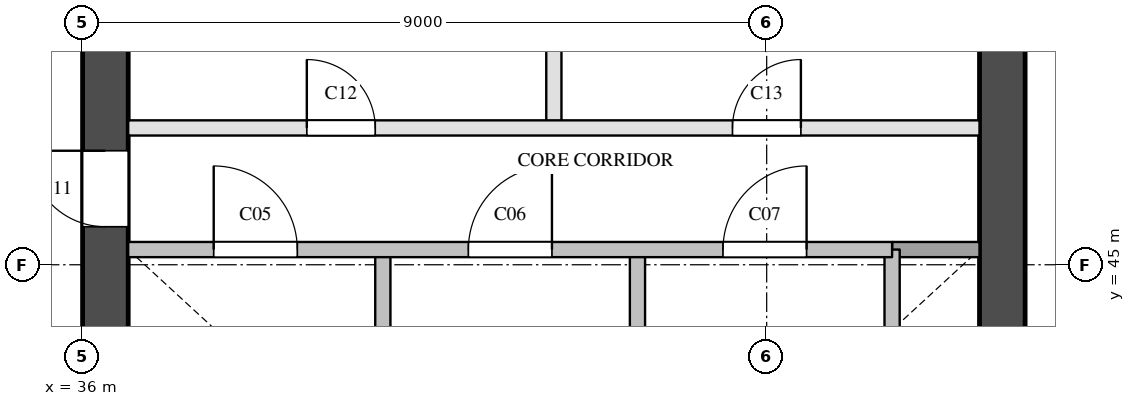
"""IFC4 building model, lengths in metres.
Left out: names, types, materials, properties, quantities, classifications, styles, units other than length and angle.
Written with IfcOpenShell. Run it as: python <this file> out.ifc"""

import sys

from ifc_helpers import new_model, si_unit, direction, frame, frame_2d, origin, place, context, subcontext, project, spatial, rectangle, extrude, element, fill, save


model = new_model("IFC4")
c1 = context("Model", 3, precision=1e-05, world=origin(), true_north=direction((0.0, 1.0)))
c2 = subcontext(c1, "Body", "Model", "MODEL_VIEW")
j1 = project(units=[si_unit("LENGTHUNIT", "METRE"), si_unit("PLANEANGLEUNIT", "RADIAN")], contexts=[c1])
p1 = place(None, origin())
s1 = spatial("IfcSite", under=j1, at=p1, CompositionType="ELEMENT")
p2 = place(p1, origin())
s2 = spatial("IfcBuilding", under=s1, at=p2, CompositionType="ELEMENT")
p3 = place(p2, frame((0.0, 0.0, 112.0)))
s3 = spatial("IfcBuildingStorey", under=s2, at=p3, CompositionType="ELEMENT", Elevation=112.0)
p4 = place(p3, frame((36.3, 29.1, 0.0), z_axis=(0.0, 0.0, 1.0), x_axis=(0.0, 1.0, 0.0)))
e1 = element("IfcWall", 1, at=p4, inside=s3, PredefinedType="SHEAR", context=c2, shape_type="SweptSolid", body=[
    extrude(rectangle(XDim=20.3, YDim=0.6, at=frame_2d((10.15, 0.0))), origin(), (0.0, 0.0, 1.0), 3.5),
])
p5 = place(p4, frame((3.6, 0.0, 0.0)))
e2 = element("IfcOpeningElement", 2, at=p5, cuts=e1, PredefinedType="OPENING", context=c2, shape_type="SweptSolid", body=[
    extrude(rectangle(XDim=1.8, YDim=2.1, at=frame_2d((0.9, 1.05))), frame((0.0, 0.31, 0.0), z_axis=(0.0, -1.0, 0.0), x_axis=(1.0, 0.0, 0.0)), (0.0, 0.0, 1.0), 0.62),
])
p6 = place(p4, frame((16.4, 0.0, 0.0)))
e3 = element("IfcOpeningElement", 3, at=p6, cuts=e1, PredefinedType="OPENING", context=c2, shape_type="SweptSolid", body=[
    extrude(rectangle(XDim=1.0, YDim=2.1, at=frame_2d((0.5, 1.05))), frame((0.0, 0.31, 0.0), z_axis=(0.0, -1.0, 0.0), x_axis=(1.0, 0.0, 0.0)), (0.0, 0.0, 1.0), 0.62),
])
p7 = place(p3, frame((48.1, 29.1, 0.0), z_axis=(0.0, 0.0, 1.0), x_axis=(0.0, 1.0, 0.0)))
e4 = element("IfcWall", 4, at=p7, inside=s3, PredefinedType="SHEAR", context=c2, shape_type="SweptSolid", body=[
    extrude(rectangle(XDim=20.3, YDim=0.6, at=frame_2d((10.15, 0.0))), origin(), (0.0, 0.0, 1.0), 3.5),
])
p8 = place(p7, frame((12.5, 0.0, 0.0)))
e5 = element("IfcOpeningElement", 5, at=p8, cuts=e4, PredefinedType="OPENING", context=c2, shape_type="SweptSolid", body=[
    extrude(rectangle(XDim=0.7, YDim=2.1, at=frame_2d((0.35, 1.05))), frame((0.0, 0.31, 0.0), z_axis=(0.0, -1.0, 0.0), x_axis=(1.0, 0.0, 0.0)), (0.0, 0.0, 1.0), 0.62),
])
p9 = place(p7, frame((3.9, 0.0, 0.0)))
e6 = element("IfcOpeningElement", 6, at=p9, cuts=e4, PredefinedType="OPENING", context=c2, shape_type="SweptSolid", body=[
    extrude(rectangle(XDim=1.8, YDim=2.1, at=frame_2d((0.9, 1.05))), frame((0.0, 0.31, 0.0), z_axis=(0.0, -1.0, 0.0), x_axis=(1.0, 0.0, 0.0)), (0.0, 0.0, 1.0), 0.62),
])
p10 = place(p3, frame((39.95, 40.78, 0.0), z_axis=(0.0, 0.0, 1.0), x_axis=(0.0, 1.0, 0.0)))
e7 = element("IfcWall", 7, at=p10, inside=s3, PredefinedType="SOLIDWALL", context=c2, shape_type="SweptSolid", body=[
    extrude(rectangle(XDim=4.42, YDim=0.2, at=frame_2d((2.21, 0.0))), origin(), (0.0, 0.0, 1.0), 3.5),
])
p11 = place(p3, frame((42.2, 46.8, 0.0), z_axis=(0.0, 0.0, 1.0), x_axis=(0.0, 1.0, 0.0)))
e8 = element("IfcWall", 8, at=p11, inside=s3, PredefinedType="PARTITIONING", context=c2, shape_type="SweptSolid", body=[
    extrude(rectangle(XDim=2.2, YDim=0.2, at=frame_2d((1.1, 0.0))), origin(), (0.0, 0.0, 1.0), 3.5),
])
for number, where, z_axis, x_axis in (
    (9, (43.3, 40.78, 0.0), (0.0, 0.0, 1.0), (0.0, 1.0, 0.0)),
    (10, (46.65, 40.78, 0.0), (0.0, 0.0, 1.0), (0.0, 1.0, 0.0)),
):
    element("IfcWall", number, at=place(p3, frame(where, z_axis=z_axis, x_axis=x_axis)), inside=s3, PredefinedType="SOLIDWALL", context=c2, shape_type="SweptSolid", body=[
        extrude(rectangle(XDim=4.42, YDim=0.2, at=frame_2d((2.21, 0.0))), origin(), (0.0, 0.0, 1.0), 3.5),
    ])
p12 = place(p3, frame((46.65, 45.2, 0.0), z_axis=(0.0, 0.0, 1.0), x_axis=(1.0, 0.0, 0.0)))
e11 = element("IfcWall", 11, at=p12, inside=s3, PredefinedType="SOLIDWALL", context=c2, shape_type="SweptSolid", body=[
    extrude(rectangle(XDim=1.15, YDim=0.2, at=frame_2d((0.575, 0.0))), origin(), (0.0, 0.0, 1.0), 3.5),
])
p13 = place(p3, frame((36.6, 45.2, 0.0), z_axis=(0.0, 0.0, 1.0), x_axis=(1.0, 0.0, 0.0)))
e12 = element("IfcWall", 12, at=p13, inside=s3, PredefinedType="SOLIDWALL", context=c2, shape_type="SweptSolid", body=[
    extrude(rectangle(XDim=10.05, YDim=0.2, at=frame_2d((5.025, 0.0))), origin(), (0.0, 0.0, 1.0), 3.5),
])
p14 = place(p13, frame((1.125, 0.0, 0.0)))
e13 = element("IfcOpeningElement", 13, at=p14, cuts=e12, PredefinedType="OPENING", context=c2, shape_type="SweptSolid", body=[
    extrude(rectangle(XDim=1.1, YDim=2.1, at=frame_2d((0.55, 1.05))), frame((0.0, 0.11, 0.0), z_axis=(0.0, -1.0, 0.0), x_axis=(1.0, 0.0, 0.0)), (0.0, 0.0, 1.0), 0.22),
])
p15 = place(p13, frame((4.475, 0.0, 0.0)))
e14 = element("IfcOpeningElement", 14, at=p15, cuts=e12, PredefinedType="OPENING", context=c2, shape_type="SweptSolid", body=[
    extrude(rectangle(XDim=1.1, YDim=2.1, at=frame_2d((0.55, 1.05))), frame((0.0, 0.11, 0.0), z_axis=(0.0, -1.0, 0.0), x_axis=(1.0, 0.0, 0.0)), (0.0, 0.0, 1.0), 0.22),
])
p16 = place(p13, frame((7.825, 0.0, 0.0)))
e15 = element("IfcOpeningElement", 15, at=p16, cuts=e12, PredefinedType="OPENING", context=c2, shape_type="SweptSolid", body=[
    extrude(rectangle(XDim=1.1, YDim=2.1, at=frame_2d((0.55, 1.05))), frame((0.0, 0.11, 0.0), z_axis=(0.0, -1.0, 0.0), x_axis=(1.0, 0.0, 0.0)), (0.0, 0.0, 1.0), 0.22),
])
p17 = place(p3, frame((36.6, 46.8, 0.0), z_axis=(0.0, 0.0, 1.0), x_axis=(1.0, 0.0, 0.0)))
e16 = element("IfcWall", 16, at=p17, inside=s3, PredefinedType="PARTITIONING", context=c2, shape_type="SweptSolid", body=[
    extrude(rectangle(XDim=11.2, YDim=0.2, at=frame_2d((5.6, 0.0))), origin(), (0.0, 0.0, 1.0), 3.5),
])
p18 = place(p17, frame((2.35, 0.0, 0.0)))
e17 = element("IfcOpeningElement", 17, at=p18, cuts=e16, PredefinedType="OPENING", context=c2, shape_type="SweptSolid", body=[
    extrude(rectangle(XDim=0.9, YDim=2.1, at=frame_2d((0.45, 1.05))), frame((0.0, 0.11, 0.0), z_axis=(0.0, -1.0, 0.0), x_axis=(1.0, 0.0, 0.0)), (0.0, 0.0, 1.0), 0.22),
])
p19 = place(p17, frame((7.95, 0.0, 0.0)))
e18 = element("IfcOpeningElement", 18, at=p19, cuts=e16, PredefinedType="OPENING", context=c2, shape_type="SweptSolid", body=[
    extrude(rectangle(XDim=0.9, YDim=2.1, at=frame_2d((0.45, 1.05))), frame((0.0, 0.11, 0.0), z_axis=(0.0, -1.0, 0.0), x_axis=(1.0, 0.0, 0.0)), (0.0, 0.0, 1.0), 0.22),
])
p20 = place(p14, origin())
e19 = element("IfcDoor", 19, at=p20, inside=s3, OperationType="SINGLE_SWING_LEFT", PredefinedType="DOOR", context=c2, shape_type="SweptSolid", body=[
    extrude(rectangle(XDim=1.1, YDim=2.1, at=frame_2d((0.55, 1.05))), frame((0.0, 0.025, 0.0), z_axis=(0.0, -1.0, 0.0), x_axis=(1.0, 0.0, 0.0)), (0.0, 0.0, 1.0), 0.05),
])
fill(e13, e19)
p21 = place(p15, origin())
e20 = element("IfcDoor", 20, at=p21, inside=s3, OperationType="SINGLE_SWING_RIGHT", PredefinedType="DOOR", context=c2, shape_type="SweptSolid", body=[
    extrude(rectangle(XDim=1.1, YDim=2.1, at=frame_2d((0.55, 1.05))), frame((0.0, 0.025, 0.0), z_axis=(0.0, -1.0, 0.0), x_axis=(1.0, 0.0, 0.0)), (0.0, 0.0, 1.0), 0.05),
])
fill(e14, e20)
p22 = place(p16, origin())
e21 = element("IfcDoor", 21, at=p22, inside=s3, OperationType="SINGLE_SWING_RIGHT", PredefinedType="DOOR", context=c2, shape_type="SweptSolid", body=[
    extrude(rectangle(XDim=1.1, YDim=2.1, at=frame_2d((0.55, 1.05))), frame((0.0, 0.025, 0.0), z_axis=(0.0, -1.0, 0.0), x_axis=(1.0, 0.0, 0.0)), (0.0, 0.0, 1.0), 0.05),
])
fill(e15, e21)
p23 = place(p6, origin())
e22 = element("IfcDoor", 22, at=p23, inside=s3, OperationType="SINGLE_SWING_RIGHT", PredefinedType="DOOR", context=c2, shape_type="SweptSolid", body=[
    extrude(rectangle(XDim=1.0, YDim=2.1, at=frame_2d((0.5, 1.05))), frame((0.0, 0.025, 0.0), z_axis=(0.0, -1.0, 0.0), x_axis=(1.0, 0.0, 0.0)), (0.0, 0.0, 1.0), 0.05),
])
fill(e3, e22)
p24 = place(p18, origin())
e23 = element("IfcDoor", 23, at=p24, inside=s3, OperationType="SINGLE_SWING_LEFT", PredefinedType="DOOR", context=c2, shape_type="SweptSolid", body=[
    extrude(rectangle(XDim=0.9, YDim=2.1, at=frame_2d((0.45, 1.05))), frame((0.0, 0.025, 0.0), z_axis=(0.0, -1.0, 0.0), x_axis=(1.0, 0.0, 0.0)), (0.0, 0.0, 1.0), 0.05),
])
fill(e17, e23)
p25 = place(p19, origin())
e24 = element("IfcDoor", 24, at=p25, inside=s3, OperationType="SINGLE_SWING_RIGHT", PredefinedType="DOOR", context=c2, shape_type="SweptSolid", body=[
    extrude(rectangle(XDim=0.9, YDim=2.1, at=frame_2d((0.45, 1.05))), frame((0.0, 0.025, 0.0), z_axis=(0.0, -1.0, 0.0), x_axis=(1.0, 0.0, 0.0)), (0.0, 0.0, 1.0), 0.05),
])
fill(e18, e24)
save(model, sys.argv[1])
